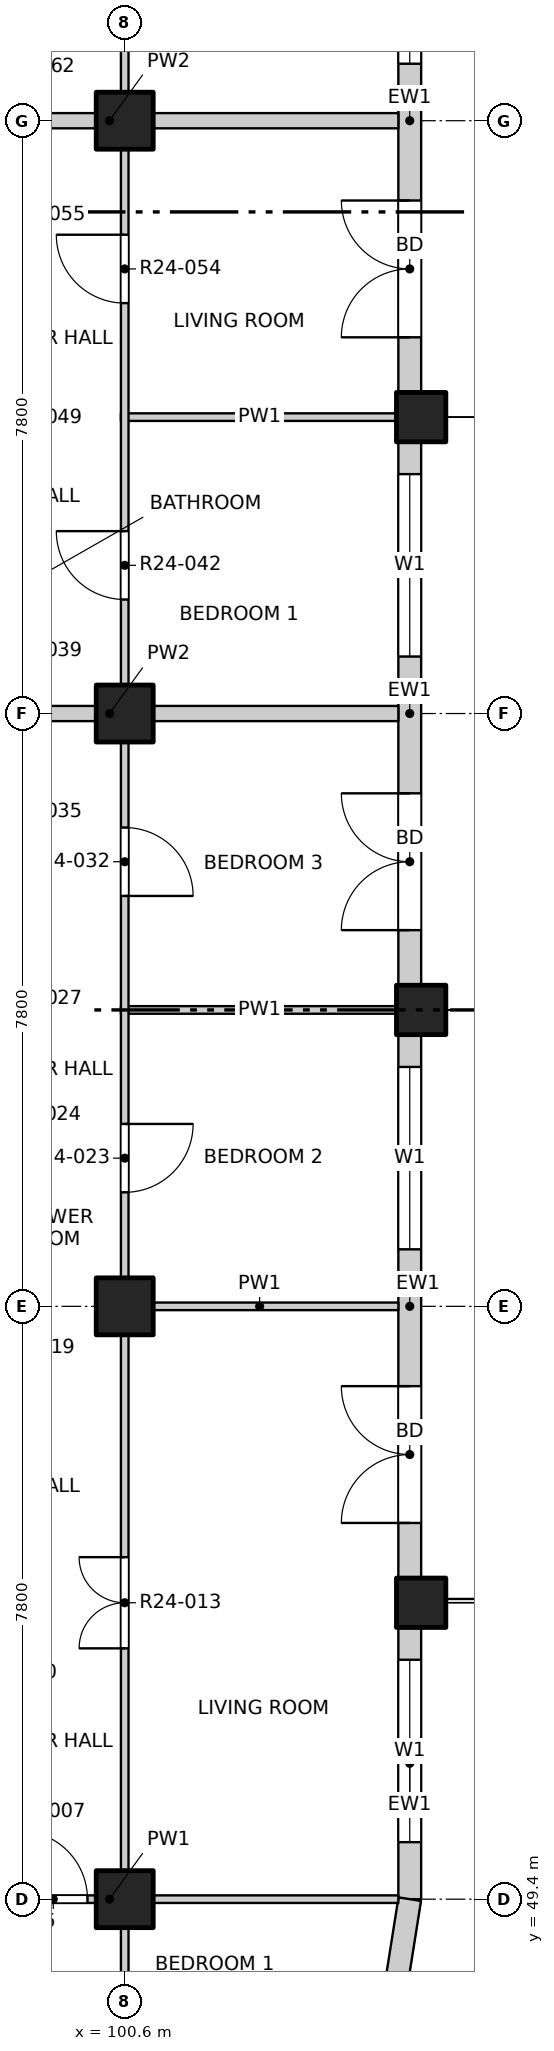
"""IFC4 building model, lengths in metres.
Left out: names, types, materials, properties, quantities, classifications, styles, units other than length and angle.
Written with IfcOpenShell. Run it as: python <this file> out.ifc"""

import sys

from ifc_helpers import new_model, si_unit, direction, frame, frame_2d, origin, origin_2d, place, context, subcontext, project, spatial, rectangle, extrude, element, fill, save


model = new_model("IFC4")
c1 = context("Model", 3, precision=1e-05, world=origin(), true_north=direction((0.0, 1.0)))
c2 = subcontext(c1, "Body", "Model", "MODEL_VIEW")
j1 = project(units=[si_unit("LENGTHUNIT", "METRE"), si_unit("PLANEANGLEUNIT", "RADIAN")], contexts=[c1])
p1 = place(None, origin())
s1 = spatial("IfcSite", under=j1, at=p1, CompositionType="ELEMENT")
p2 = place(p1, origin())
s2 = spatial("IfcBuilding", under=s1, at=p2, CompositionType="ELEMENT")
p3 = place(p2, frame((0.0, 0.0, 249.4)))
s3 = spatial("IfcBuildingStorey", under=s2, at=p3, CompositionType="ELEMENT", Elevation=249.4)
for number, where, z_axis, x_axis in (
    (1, (104.5, 53.3, -0.25), (0.0, 0.0, 1.0), (1.0, 0.0, 0.0)),
    (2, (104.5, 61.1, -0.25), (0.0, 0.0, 1.0), (1.0, 0.0, 0.0)),
    (3, (104.5, 68.9, -0.25), (0.0, 0.0, 1.0), (1.0, 0.0, 0.0)),
):
    element("IfcColumn", number, at=place(p3, frame(where, z_axis=z_axis, x_axis=x_axis)), inside=s3, PredefinedType="COLUMN", context=c2, shape_type="SweptSolid", body=[
        extrude(rectangle(XDim=0.65, YDim=0.65, at=origin_2d()), origin(), (0.0, 0.0, 1.0), 3.4),
    ])
for number, where, z_axis, x_axis in (
    (4, (100.6, 49.4, -0.25), (0.0, 0.0, 1.0), (1.0, 0.0, 0.0)),
    (5, (100.6, 57.2, -0.25), (0.0, 0.0, 1.0), (1.0, 0.0, 0.0)),
    (6, (100.6, 65.0, -0.25), (0.0, 0.0, 1.0), (1.0, 0.0, 0.0)),
    (7, (100.6, 72.8, -0.25), (0.0, 0.0, 1.0), (1.0, 0.0, 0.0)),
):
    element("IfcColumn", number, at=place(p3, frame(where, z_axis=z_axis, x_axis=x_axis)), inside=s3, PredefinedType="COLUMN", context=c2, shape_type="SweptSolid", body=[
        extrude(rectangle(XDim=0.75, YDim=0.75, at=origin_2d()), origin(), (0.0, 0.0, 1.0), 3.4),
    ])
p4 = place(p3, frame((104.35, 49.4, 0.0), z_axis=(0.0, 0.0, 1.0), x_axis=(0.0, 1.0, 0.0)))
e8 = element("IfcWall", 8, at=p4, inside=s3, PredefinedType="SOLIDWALL", context=c2, shape_type="SweptSolid", body=[
    extrude(rectangle(XDim=3.575, YDim=0.3, at=frame_2d((1.788, 0.0))), origin(), (0.0, 0.0, 1.0), 2.7),
])
p5 = place(p4, frame((0.75, 0.0, 0.9)))
e9 = element("IfcOpeningElement", 9, at=p5, cuts=e8, PredefinedType="OPENING", context=c2, shape_type="SweptSolid", body=[
    extrude(rectangle(XDim=2.4, YDim=1.8, at=frame_2d((1.2, 0.9))), frame((0.0, 0.16, 0.0), z_axis=(0.0, -1.0, 0.0), x_axis=(1.0, 0.0, 0.0)), (0.0, 0.0, 1.0), 0.32),
])
p6 = place(p3, frame((104.35, 53.625, 0.0), z_axis=(0.0, 0.0, 1.0), x_axis=(0.0, 1.0, 0.0)))
e10 = element("IfcWall", 10, at=p6, inside=s3, PredefinedType="SOLIDWALL", context=c2, shape_type="SweptSolid", body=[
    extrude(rectangle(XDim=7.15, YDim=0.3, at=frame_2d((3.575, 0.0))), origin(), (0.0, 0.0, 1.0), 2.7),
])
p7 = place(p6, frame((0.725, 0.0, 0.0)))
e11 = element("IfcOpeningElement", 11, at=p7, cuts=e10, PredefinedType="OPENING", context=c2, shape_type="SweptSolid", body=[
    extrude(rectangle(XDim=1.8, YDim=2.4, at=frame_2d((0.9, 1.2))), frame((0.0, 0.16, 0.0), z_axis=(0.0, -1.0, 0.0), x_axis=(1.0, 0.0, 0.0)), (0.0, 0.0, 1.0), 0.32),
])
p8 = place(p6, frame((4.325, 0.0, 0.9)))
e12 = element("IfcOpeningElement", 12, at=p8, cuts=e10, PredefinedType="OPENING", context=c2, shape_type="SweptSolid", body=[
    extrude(rectangle(XDim=2.4, YDim=1.8, at=frame_2d((1.2, 0.9))), frame((0.0, 0.16, 0.0), z_axis=(0.0, -1.0, 0.0), x_axis=(1.0, 0.0, 0.0)), (0.0, 0.0, 1.0), 0.32),
])
p9 = place(p3, frame((104.35, 61.425, 0.0), z_axis=(0.0, 0.0, 1.0), x_axis=(0.0, 1.0, 0.0)))
e13 = element("IfcWall", 13, at=p9, inside=s3, PredefinedType="SOLIDWALL", context=c2, shape_type="SweptSolid", body=[
    extrude(rectangle(XDim=7.15, YDim=0.3, at=frame_2d((3.575, 0.0))), origin(), (0.0, 0.0, 1.0), 2.7),
])
p10 = place(p9, frame((0.725, 0.0, 0.0)))
e14 = element("IfcOpeningElement", 14, at=p10, cuts=e13, PredefinedType="OPENING", context=c2, shape_type="SweptSolid", body=[
    extrude(rectangle(XDim=1.8, YDim=2.4, at=frame_2d((0.9, 1.2))), frame((0.0, 0.16, 0.0), z_axis=(0.0, -1.0, 0.0), x_axis=(1.0, 0.0, 0.0)), (0.0, 0.0, 1.0), 0.32),
])
p11 = place(p9, frame((4.325, 0.0, 0.9)))
e15 = element("IfcOpeningElement", 15, at=p11, cuts=e13, PredefinedType="OPENING", context=c2, shape_type="SweptSolid", body=[
    extrude(rectangle(XDim=2.4, YDim=1.8, at=frame_2d((1.2, 0.9))), frame((0.0, 0.16, 0.0), z_axis=(0.0, -1.0, 0.0), x_axis=(1.0, 0.0, 0.0)), (0.0, 0.0, 1.0), 0.32),
])
p12 = place(p3, frame((104.35, 69.225, 0.0), z_axis=(0.0, 0.0, 1.0), x_axis=(0.0, 1.0, 0.0)))
e16 = element("IfcWall", 16, at=p12, inside=s3, PredefinedType="SOLIDWALL", context=c2, shape_type="SweptSolid", body=[
    extrude(rectangle(XDim=7.15, YDim=0.3, at=frame_2d((3.575, 0.0))), origin(), (0.0, 0.0, 1.0), 2.7),
])
p13 = place(p12, frame((0.725, 0.0, 0.0)))
e17 = element("IfcOpeningElement", 17, at=p13, cuts=e16, PredefinedType="OPENING", context=c2, shape_type="SweptSolid", body=[
    extrude(rectangle(XDim=1.8, YDim=2.4, at=frame_2d((0.9, 1.2))), frame((0.0, 0.16, 0.0), z_axis=(0.0, -1.0, 0.0), x_axis=(1.0, 0.0, 0.0)), (0.0, 0.0, 1.0), 0.32),
])
p14 = place(p12, frame((4.325, 0.0, 0.9)))
e18 = element("IfcOpeningElement", 18, at=p14, cuts=e16, PredefinedType="OPENING", context=c2, shape_type="SweptSolid", body=[
    extrude(rectangle(XDim=2.4, YDim=1.8, at=frame_2d((1.2, 0.9))), frame((0.0, 0.16, 0.0), z_axis=(0.0, -1.0, 0.0), x_axis=(1.0, 0.0, 0.0)), (0.0, 0.0, 1.0), 0.32),
])
p15 = place(p3, frame((104.167, 48.241, 0.0), z_axis=(0.0, 0.0, 1.0), x_axis=(0.156496880861, 0.987678452879, 0.0)))
e19 = element("IfcWall", 19, at=p15, inside=s3, PredefinedType="SOLIDWALL", context=c2, shape_type="SweptSolid", body=[
    extrude(rectangle(XDim=1.173, YDim=0.3, at=frame_2d((0.586, 0.0))), origin(), (0.0, 0.0, 1.0), 2.7),
])
p16 = place(p3, frame((96.6, 49.4, 0.0), z_axis=(0.0, 0.0, 1.0), x_axis=(1.0, 0.0, 0.0)))
e20 = element("IfcWall", 20, at=p16, inside=s3, PredefinedType="PARTITIONING", context=c2, shape_type="SweptSolid", body=[
    extrude(rectangle(XDim=7.6, YDim=0.1, at=frame_2d((3.8, 0.0))), origin(), (0.0, 0.0, 1.0), 3.15),
])
p17 = place(p16, frame((2.61, 0.0, 0.0)))
e21 = element("IfcOpeningElement", 21, at=p17, cuts=e20, PredefinedType="OPENING", context=c2, shape_type="SweptSolid", body=[
    extrude(rectangle(XDim=0.9, YDim=2.1, at=frame_2d((0.45, 1.05))), frame((0.0, 0.06, 0.0), z_axis=(0.0, -1.0, 0.0), x_axis=(1.0, 0.0, 0.0)), (0.0, 0.0, 1.0), 0.12),
])
p18 = place(p3, frame((100.55, 57.2, 0.0), z_axis=(0.0, 0.0, 1.0), x_axis=(1.0, 0.0, 0.0)))
e22 = element("IfcWall", 22, at=p18, inside=s3, PredefinedType="PARTITIONING", context=c2, shape_type="SweptSolid", body=[
    extrude(rectangle(XDim=3.65, YDim=0.1, at=frame_2d((1.825, 0.0))), origin(), (0.0, 0.0, 1.0), 3.15),
])
p19 = place(p3, frame((100.55, 61.1, 0.0), z_axis=(0.0, 0.0, 1.0), x_axis=(1.0, 0.0, 0.0)))
e23 = element("IfcWall", 23, at=p19, inside=s3, PredefinedType="PARTITIONING", context=c2, shape_type="SweptSolid", body=[
    extrude(rectangle(XDim=3.65, YDim=0.1, at=frame_2d((1.825, 0.0))), origin(), (0.0, 0.0, 1.0), 2.55),
])
p20 = place(p3, frame((96.6, 65.0, 0.0), z_axis=(0.0, 0.0, 1.0), x_axis=(1.0, 0.0, 0.0)))
e24 = element("IfcWall", 24, at=p20, inside=s3, PredefinedType="PARTITIONING", context=c2, shape_type="SweptSolid", body=[
    extrude(rectangle(XDim=7.6, YDim=0.2, at=frame_2d((3.8, 0.0))), origin(), (0.0, 0.0, 1.0), 3.15),
])
p21 = place(p3, frame((100.55, 68.9, 0.0), z_axis=(0.0, 0.0, 1.0), x_axis=(1.0, 0.0, 0.0)))
e25 = element("IfcWall", 25, at=p21, inside=s3, PredefinedType="PARTITIONING", context=c2, shape_type="SweptSolid", body=[
    extrude(rectangle(XDim=3.65, YDim=0.1, at=frame_2d((1.825, 0.0))), origin(), (0.0, 0.0, 1.0), 2.55),
])
p22 = place(p3, frame((96.6, 72.8, 0.0), z_axis=(0.0, 0.0, 1.0), x_axis=(1.0, 0.0, 0.0)))
e26 = element("IfcWall", 26, at=p22, inside=s3, PredefinedType="PARTITIONING", context=c2, shape_type="SweptSolid", body=[
    extrude(rectangle(XDim=7.6, YDim=0.2, at=frame_2d((3.8, 0.0))), origin(), (0.0, 0.0, 1.0), 3.15),
])
p23 = place(p3, frame((100.6, 45.8, 0.0), z_axis=(0.0, 0.0, 1.0), x_axis=(0.0, 1.0, 0.0)))
e27 = element("IfcWall", 27, at=p23, inside=s3, PredefinedType="PARTITIONING", context=c2, shape_type="SweptSolid", body=[
    extrude(rectangle(XDim=38.4, YDim=0.1, at=frame_2d((19.2, 0.0))), origin(), (0.0, 0.0, 1.0), 3.15),
])
p24 = place(p23, frame((1.05, 0.0, 0.0)))
e28 = element("IfcOpeningElement", 28, at=p24, cuts=e27, PredefinedType="OPENING", context=c2, shape_type="SweptSolid", body=[
    extrude(rectangle(XDim=1.2, YDim=2.1, at=frame_2d((0.6, 1.05))), frame((0.0, 0.06, 0.0), z_axis=(0.0, -1.0, 0.0), x_axis=(1.0, 0.0, 0.0)), (0.0, 0.0, 1.0), 0.12),
])
p25 = place(p23, frame((6.9, 0.0, 0.0)))
e29 = element("IfcOpeningElement", 29, at=p25, cuts=e27, PredefinedType="OPENING", context=c2, shape_type="SweptSolid", body=[
    extrude(rectangle(XDim=1.2, YDim=2.1, at=frame_2d((0.6, 1.05))), frame((0.0, 0.06, 0.0), z_axis=(0.0, -1.0, 0.0), x_axis=(1.0, 0.0, 0.0)), (0.0, 0.0, 1.0), 0.12),
])
p26 = place(p23, frame((12.9, 0.0, 0.0)))
e30 = element("IfcOpeningElement", 30, at=p26, cuts=e27, PredefinedType="OPENING", context=c2, shape_type="SweptSolid", body=[
    extrude(rectangle(XDim=0.9, YDim=2.1, at=frame_2d((0.45, 1.05))), frame((0.0, 0.06, 0.0), z_axis=(0.0, -1.0, 0.0), x_axis=(1.0, 0.0, 0.0)), (0.0, 0.0, 1.0), 0.12),
])
p27 = place(p23, frame((16.8, 0.0, 0.0)))
e31 = element("IfcOpeningElement", 31, at=p27, cuts=e27, PredefinedType="OPENING", context=c2, shape_type="SweptSolid", body=[
    extrude(rectangle(XDim=0.9, YDim=2.1, at=frame_2d((0.45, 1.05))), frame((0.0, 0.06, 0.0), z_axis=(0.0, -1.0, 0.0), x_axis=(1.0, 0.0, 0.0)), (0.0, 0.0, 1.0), 0.12),
])
p28 = place(p23, frame((20.7, 0.0, 0.0)))
e32 = element("IfcOpeningElement", 32, at=p28, cuts=e27, PredefinedType="OPENING", context=c2, shape_type="SweptSolid", body=[
    extrude(rectangle(XDim=0.9, YDim=2.1, at=frame_2d((0.45, 1.05))), frame((0.0, 0.06, 0.0), z_axis=(0.0, -1.0, 0.0), x_axis=(1.0, 0.0, 0.0)), (0.0, 0.0, 1.0), 0.12),
])
p29 = place(p23, frame((24.6, 0.0, 0.0)))
e33 = element("IfcOpeningElement", 33, at=p29, cuts=e27, PredefinedType="OPENING", context=c2, shape_type="SweptSolid", body=[
    extrude(rectangle(XDim=0.9, YDim=2.1, at=frame_2d((0.45, 1.05))), frame((0.0, 0.06, 0.0), z_axis=(0.0, -1.0, 0.0), x_axis=(1.0, 0.0, 0.0)), (0.0, 0.0, 1.0), 0.12),
])
p30 = place(p23, frame((30.3, 0.0, 0.0)))
e34 = element("IfcOpeningElement", 34, at=p30, cuts=e27, PredefinedType="OPENING", context=c2, shape_type="SweptSolid", body=[
    extrude(rectangle(XDim=1.2, YDim=2.1, at=frame_2d((0.6, 1.05))), frame((0.0, 0.06, 0.0), z_axis=(0.0, -1.0, 0.0), x_axis=(1.0, 0.0, 0.0)), (0.0, 0.0, 1.0), 0.12),
])
p31 = place(p23, frame((36.15, 0.0, 0.0)))
e35 = element("IfcOpeningElement", 35, at=p31, cuts=e27, PredefinedType="OPENING", context=c2, shape_type="SweptSolid", body=[
    extrude(rectangle(XDim=1.2, YDim=2.1, at=frame_2d((0.6, 1.05))), frame((0.0, 0.06, 0.0), z_axis=(0.0, -1.0, 0.0), x_axis=(1.0, 0.0, 0.0)), (0.0, 0.0, 1.0), 0.12),
])
p32 = place(p5, origin())
e36 = element("IfcWindow", 36, at=p32, inside=s3, PartitioningType="DOUBLE_PANEL_VERTICAL", PredefinedType="WINDOW", context=c2, shape_type="SweptSolid", body=[
    extrude(rectangle(XDim=2.4, YDim=1.8, at=frame_2d((1.2, 0.9))), frame((0.0, 0.03, 0.0), z_axis=(0.0, -1.0, 0.0), x_axis=(1.0, 0.0, 0.0)), (0.0, 0.0, 1.0), 0.06),
])
fill(e9, e36)
p33 = place(p7, origin())
e37 = element("IfcDoor", 37, at=p33, inside=s3, OperationType="DOUBLE_DOOR_SINGLE_SWING", PredefinedType="DOOR", context=c2, shape_type="SweptSolid", body=[
    extrude(rectangle(XDim=1.8, YDim=2.4, at=frame_2d((0.9, 1.2))), frame((0.0, 0.025, 0.0), z_axis=(0.0, -1.0, 0.0), x_axis=(1.0, 0.0, 0.0)), (0.0, 0.0, 1.0), 0.05),
])
fill(e11, e37)
p34 = place(p8, origin())
e38 = element("IfcWindow", 38, at=p34, inside=s3, PartitioningType="DOUBLE_PANEL_VERTICAL", PredefinedType="WINDOW", context=c2, shape_type="SweptSolid", body=[
    extrude(rectangle(XDim=2.4, YDim=1.8, at=frame_2d((1.2, 0.9))), frame((0.0, 0.03, 0.0), z_axis=(0.0, -1.0, 0.0), x_axis=(1.0, 0.0, 0.0)), (0.0, 0.0, 1.0), 0.06),
])
fill(e12, e38)
p35 = place(p10, origin())
e39 = element("IfcDoor", 39, at=p35, inside=s3, OperationType="DOUBLE_DOOR_SINGLE_SWING", PredefinedType="DOOR", context=c2, shape_type="SweptSolid", body=[
    extrude(rectangle(XDim=1.8, YDim=2.4, at=frame_2d((0.9, 1.2))), frame((0.0, 0.025, 0.0), z_axis=(0.0, -1.0, 0.0), x_axis=(1.0, 0.0, 0.0)), (0.0, 0.0, 1.0), 0.05),
])
fill(e14, e39)
p36 = place(p11, origin())
e40 = element("IfcWindow", 40, at=p36, inside=s3, PartitioningType="DOUBLE_PANEL_VERTICAL", PredefinedType="WINDOW", context=c2, shape_type="SweptSolid", body=[
    extrude(rectangle(XDim=2.4, YDim=1.8, at=frame_2d((1.2, 0.9))), frame((0.0, 0.03, 0.0), z_axis=(0.0, -1.0, 0.0), x_axis=(1.0, 0.0, 0.0)), (0.0, 0.0, 1.0), 0.06),
])
fill(e15, e40)
p37 = place(p13, origin())
e41 = element("IfcDoor", 41, at=p37, inside=s3, OperationType="DOUBLE_DOOR_SINGLE_SWING", PredefinedType="DOOR", context=c2, shape_type="SweptSolid", body=[
    extrude(rectangle(XDim=1.8, YDim=2.4, at=frame_2d((0.9, 1.2))), frame((0.0, 0.025, 0.0), z_axis=(0.0, -1.0, 0.0), x_axis=(1.0, 0.0, 0.0)), (0.0, 0.0, 1.0), 0.05),
])
fill(e17, e41)
p38 = place(p14, origin())
e42 = element("IfcWindow", 42, at=p38, inside=s3, PartitioningType="DOUBLE_PANEL_VERTICAL", PredefinedType="WINDOW", context=c2, shape_type="SweptSolid", body=[
    extrude(rectangle(XDim=2.4, YDim=1.8, at=frame_2d((1.2, 0.9))), frame((0.0, 0.03, 0.0), z_axis=(0.0, -1.0, 0.0), x_axis=(1.0, 0.0, 0.0)), (0.0, 0.0, 1.0), 0.06),
])
fill(e18, e42)
p39 = place(p17, origin())
e43 = element("IfcDoor", 43, at=p39, inside=s3, OperationType="SINGLE_SWING_LEFT", PredefinedType="DOOR", context=c2, shape_type="SweptSolid", body=[
    extrude(rectangle(XDim=0.9, YDim=2.1, at=frame_2d((0.45, 1.05))), frame((0.0, 0.025, 0.0), z_axis=(0.0, -1.0, 0.0), x_axis=(1.0, 0.0, 0.0)), (0.0, 0.0, 1.0), 0.05),
])
fill(e21, e43)
p40 = place(p25, origin())
e44 = element("IfcDoor", 44, at=p40, inside=s3, OperationType="DOUBLE_DOOR_SINGLE_SWING", PredefinedType="DOOR", context=c2, shape_type="SweptSolid", body=[
    extrude(rectangle(XDim=1.2, YDim=2.1, at=frame_2d((0.6, 1.05))), frame((0.0, 0.025, 0.0), z_axis=(0.0, -1.0, 0.0), x_axis=(1.0, 0.0, 0.0)), (0.0, 0.0, 1.0), 0.05),
])
fill(e29, e44)
p41 = place(p26, origin())
e45 = element("IfcDoor", 45, at=p41, inside=s3, OperationType="SINGLE_SWING_LEFT", PredefinedType="DOOR", context=c2, shape_type="SweptSolid", body=[
    extrude(rectangle(XDim=0.9, YDim=2.1, at=frame_2d((0.45, 1.05))), frame((0.0, 0.025, 0.0), z_axis=(0.0, -1.0, 0.0), x_axis=(1.0, 0.0, 0.0)), (0.0, 0.0, 1.0), 0.05),
])
fill(e30, e45)
p42 = place(p27, origin())
e46 = element("IfcDoor", 46, at=p42, inside=s3, OperationType="SINGLE_SWING_RIGHT", PredefinedType="DOOR", context=c2, shape_type="SweptSolid", body=[
    extrude(rectangle(XDim=0.9, YDim=2.1, at=frame_2d((0.45, 1.05))), frame((0.0, 0.025, 0.0), z_axis=(0.0, -1.0, 0.0), x_axis=(1.0, 0.0, 0.0)), (0.0, 0.0, 1.0), 0.05),
])
fill(e31, e46)
p43 = place(p28, origin())
e47 = element("IfcDoor", 47, at=p43, inside=s3, OperationType="SINGLE_SWING_RIGHT", PredefinedType="DOOR", context=c2, shape_type="SweptSolid", body=[
    extrude(rectangle(XDim=0.9, YDim=2.1, at=frame_2d((0.45, 1.05))), frame((0.0, 0.025, 0.0), z_axis=(0.0, -1.0, 0.0), x_axis=(1.0, 0.0, 0.0)), (0.0, 0.0, 1.0), 0.05),
])
fill(e32, e47)
p44 = place(p29, origin())
e48 = element("IfcDoor", 48, at=p44, inside=s3, OperationType="SINGLE_SWING_RIGHT", PredefinedType="DOOR", context=c2, shape_type="SweptSolid", body=[
    extrude(rectangle(XDim=0.9, YDim=2.1, at=frame_2d((0.45, 1.05))), frame((0.0, 0.025, 0.0), z_axis=(0.0, -1.0, 0.0), x_axis=(1.0, 0.0, 0.0)), (0.0, 0.0, 1.0), 0.05),
])
fill(e33, e48)
save(model, sys.argv[1])
